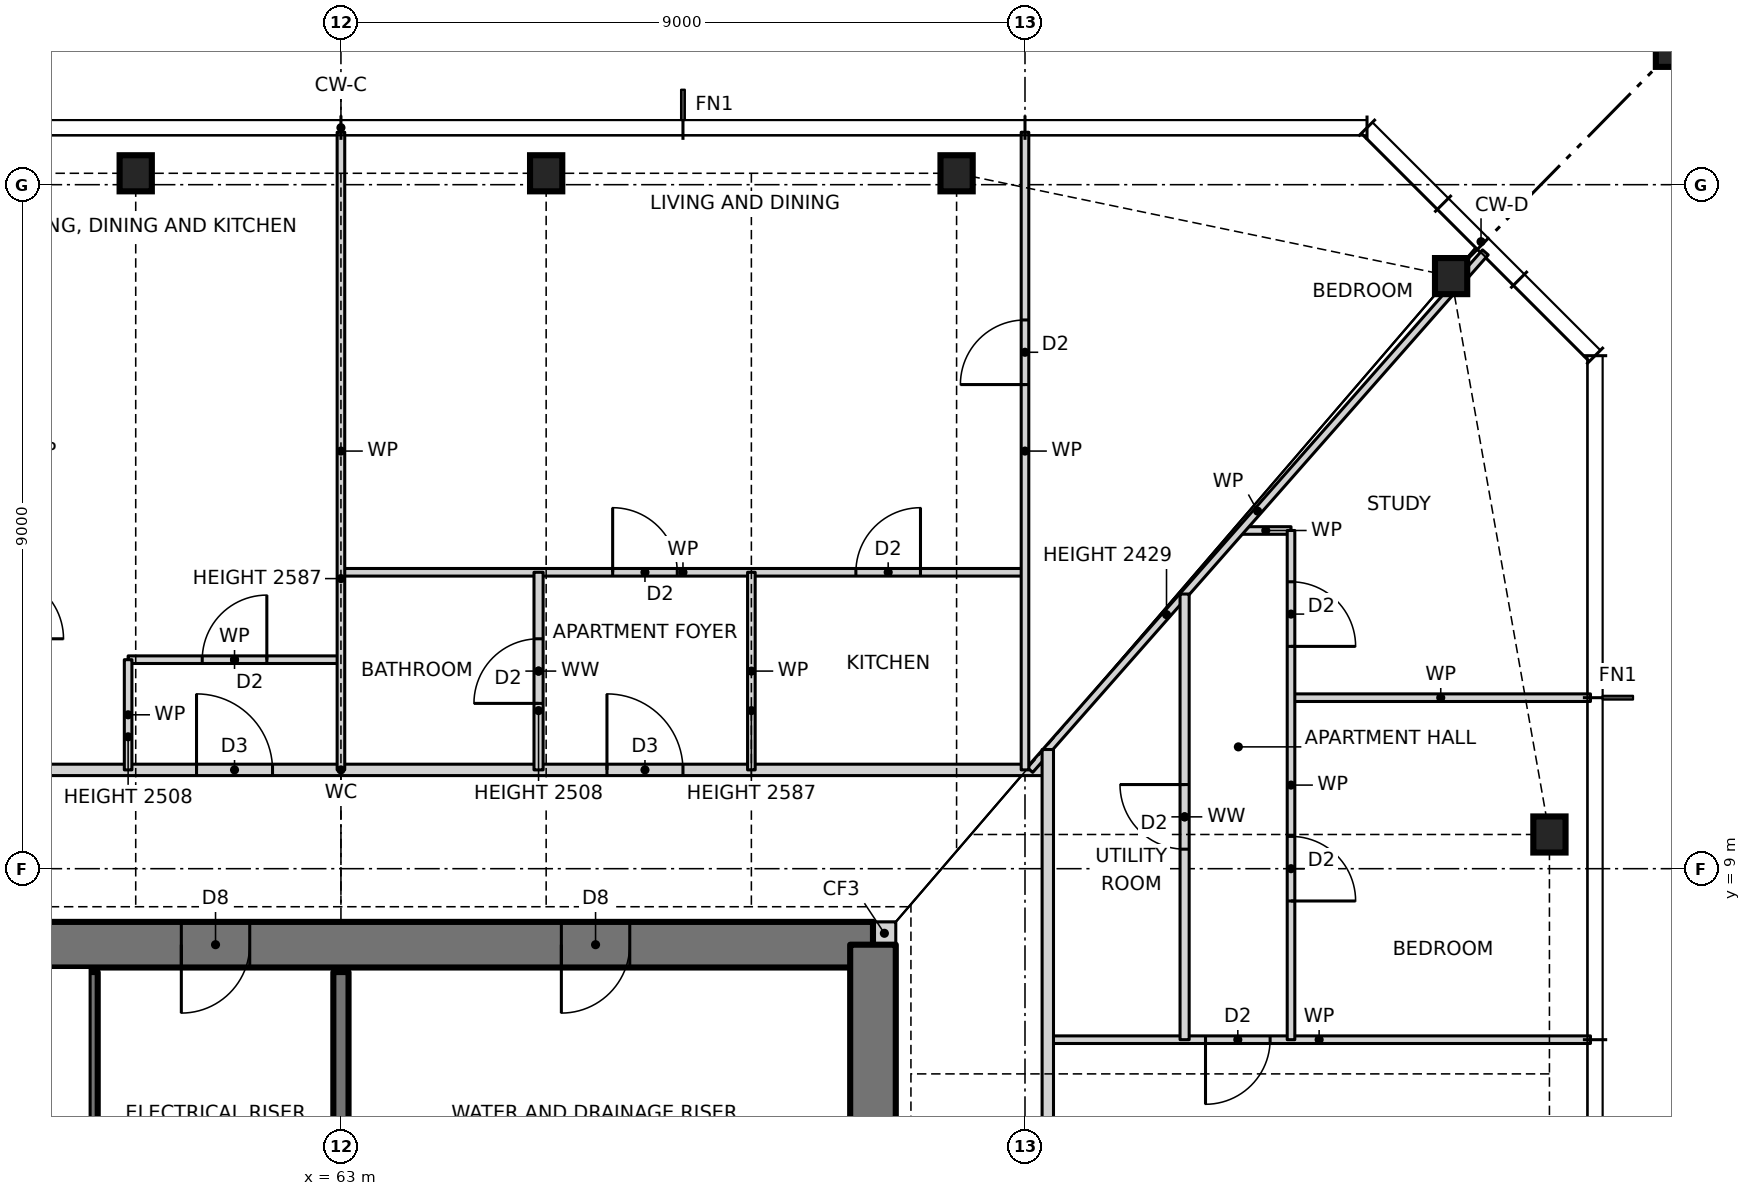
"""IFC4 building model, lengths in metres.
Left out: names, types, materials, properties, quantities, classifications, styles, units other than length and angle.
Written with IfcOpenShell. Run it as: python <this file> out.ifc"""

import sys

from ifc_helpers import new_model, si_unit, direction, frame, frame_2d, origin, origin_2d, place, context, subcontext, project, spatial, rectangle, hollow_rectangle, i_section, extrude, element, fill, save


model = new_model("IFC4")
c1 = context("Model", 3, precision=1e-05, world=origin(), true_north=direction((0.0, 1.0)))
c2 = subcontext(c1, "Body", "Model", "MODEL_VIEW")
j1 = project(units=[si_unit("LENGTHUNIT", "METRE"), si_unit("PLANEANGLEUNIT", "RADIAN")], contexts=[c1])
p1 = place(None, origin())
s1 = spatial("IfcSite", under=j1, at=p1, CompositionType="ELEMENT")
p2 = place(p1, origin())
s2 = spatial("IfcBuilding", under=s1, at=p2, CompositionType="ELEMENT")
p3 = place(p2, frame((0.0, 0.0, 67.5)))
s3 = spatial("IfcBuildingStorey", under=s2, at=p3, CompositionType="ELEMENT", Elevation=67.5)
for number, where, z_axis, x_axis in (
    (1, (78.9, 9.45, 0.0), (0.0, 0.0, 1.0), (1.0, 0.0, 0.0)),
    (2, (77.606, 16.797, 0.0), (0.0, 0.0, 1.0), (1.0, 0.0, 0.0)),
    (3, (71.1, 18.15, 0.0), (0.0, 0.0, 1.0), (1.0, 0.0, 0.0)),
    (4, (65.7, 18.15, 0.0), (0.0, 0.0, 1.0), (1.0, 0.0, 0.0)),
    (5, (60.3, 18.15, 0.0), (0.0, 0.0, 1.0), (1.0, 0.0, 0.0)),
):
    element("IfcColumn", number, at=place(p3, frame(where, z_axis=z_axis, x_axis=x_axis)), inside=s3, PredefinedType="COLUMN", context=c2, shape_type="SweptSolid", body=[
        extrude(i_section(OverallWidth=0.424, OverallDepth=0.475, WebThickness=0.048, FlangeThickness=0.077, at=origin_2d()), origin(), (0.0, 0.0, 1.0), 3.5),
    ])
p4 = place(p3, frame((80.9, 20.15, 0.0), z_axis=(0.0, 0.0, 1.0), x_axis=(1.0, 0.0, 0.0)))
e6 = element("IfcColumn", 6, at=p4, inside=s3, PredefinedType="COLUMN", context=c2, shape_type="SweptSolid", body=[
    extrude(hollow_rectangle(XDim=1.2, YDim=1.2, WallThickness=0.07, at=origin_2d()), origin(), (0.0, 0.0, 1.0), 3.5),
])
p5 = place(p3, frame((70.0, 8.15, 0.0), z_axis=(0.0, 0.0, 1.0), x_axis=(1.0, 0.0, 0.0)))
e7 = element("IfcWall", 7, at=p5, inside=s3, PredefinedType="SOLIDWALL", context=c2, shape_type="SweptSolid", body=[
    extrude(rectangle(XDim=0.3, YDim=0.3, at=frame_2d((0.15, 0.0))), origin(), (0.0, 0.0, 1.0), 3.5),
])
p6 = place(p3, frame((70.0, 8.0, 0.0), z_axis=(0.0, 0.0, 1.0), x_axis=(-1.0, 0.0, 0.0)))
e8 = element("IfcWall", 8, at=p6, inside=s3, PredefinedType="SHEAR", context=c2, shape_type="SweptSolid", body=[
    extrude(rectangle(XDim=14.0, YDim=0.6, at=frame_2d((7.0, 0.0))), origin(), (0.0, 0.0, 1.0), 3.5),
])
p7 = place(p6, frame((8.2, 0.0, 0.0)))
e9 = element("IfcOpeningElement", 9, at=p7, cuts=e8, PredefinedType="OPENING", context=c2, shape_type="SweptSolid", body=[
    extrude(rectangle(XDim=0.9, YDim=2.1, at=frame_2d((0.45, 1.05))), frame((0.0, 0.31, 0.0), z_axis=(0.0, -1.0, 0.0), x_axis=(1.0, 0.0, 0.0)), (0.0, 0.0, 1.0), 0.62),
])
p8 = place(p6, frame((3.2, 0.0, 0.0)))
e10 = element("IfcOpeningElement", 10, at=p8, cuts=e8, PredefinedType="OPENING", context=c2, shape_type="SweptSolid", body=[
    extrude(rectangle(XDim=0.9, YDim=2.1, at=frame_2d((0.45, 1.05))), frame((0.0, 0.31, 0.0), z_axis=(0.0, -1.0, 0.0), x_axis=(1.0, 0.0, 0.0)), (0.0, 0.0, 1.0), 0.62),
])
p9 = place(p3, frame((70.0, -8.0, 0.0), z_axis=(0.0, 0.0, 1.0), x_axis=(0.0, 1.0, 0.0)))
e11 = element("IfcWall", 11, at=p9, inside=s3, PredefinedType="SHEAR", context=c2, shape_type="SweptSolid", body=[
    extrude(rectangle(XDim=16.0, YDim=0.6, at=frame_2d((8.0, 0.0))), origin(), (0.0, 0.0, 1.0), 3.5),
])
p10 = place(p9, frame((7.5, 0.0, 0.0)))
e12 = element("IfcOpeningElement", 12, at=p10, cuts=e11, PredefinedType="OPENING", context=c2, shape_type="SweptSolid", body=[
    extrude(rectangle(XDim=1.0, YDim=2.1, at=frame_2d((0.5, 1.05))), frame((0.0, 0.31, 0.0), z_axis=(0.0, -1.0, 0.0), x_axis=(1.0, 0.0, 0.0)), (0.0, 0.0, 1.0), 0.62),
])
p11 = place(p3, frame((72.3, 6.75, 0.0), z_axis=(0.0, 0.0, 1.0), x_axis=(1.0, 0.0, 0.0)))
e13 = element("IfcWall", 13, at=p11, inside=s3, PredefinedType="PARTITIONING", context=c2, shape_type="SweptSolid", body=[
    extrude(rectangle(XDim=7.14, YDim=0.1, at=frame_2d((3.57, 0.0))), origin(), (0.0, 0.0, 1.0), 3.27),
])
p12 = place(p11, frame((2.075, 0.0, 0.0)))
e14 = element("IfcOpeningElement", 14, at=p12, cuts=e13, PredefinedType="OPENING", context=c2, shape_type="SweptSolid", body=[
    extrude(rectangle(XDim=0.85, YDim=2.1, at=frame_2d((0.425, 1.05))), frame((0.0, 0.06, 0.0), z_axis=(0.0, -1.0, 0.0), x_axis=(1.0, 0.0, 0.0)), (0.0, 0.0, 1.0), 0.12),
])
p13 = place(p3, frame((53.7, 10.3, 0.0), z_axis=(0.0, 0.0, 1.0), x_axis=(1.0, 0.0, 0.0)))
e15 = element("IfcWall", 15, at=p13, inside=s3, PredefinedType="PARTITIONING", context=c2, shape_type="SweptSolid", body=[
    extrude(rectangle(XDim=18.6, YDim=0.15, at=frame_2d((9.3, 0.0))), origin(), (0.0, 0.0, 1.0), 3.27),
])
p14 = place(p13, frame((12.8, 0.0, 0.0)))
e16 = element("IfcOpeningElement", 16, at=p14, cuts=e15, PredefinedType="OPENING", context=c2, shape_type="SweptSolid", body=[
    extrude(rectangle(XDim=1.0, YDim=2.1, at=frame_2d((0.5, 1.05))), frame((0.0, 0.085, 0.0), z_axis=(0.0, -1.0, 0.0), x_axis=(1.0, 0.0, 0.0)), (0.0, 0.0, 1.0), 0.17),
])
p15 = place(p13, frame((7.4, 0.0, 0.0)))
e17 = element("IfcOpeningElement", 17, at=p15, cuts=e15, PredefinedType="OPENING", context=c2, shape_type="SweptSolid", body=[
    extrude(rectangle(XDim=1.0, YDim=2.1, at=frame_2d((0.5, 1.05))), frame((0.0, 0.085, 0.0), z_axis=(0.0, -1.0, 0.0), x_axis=(1.0, 0.0, 0.0)), (0.0, 0.0, 1.0), 0.17),
])
p16 = place(p3, frame((75.5, 11.25, 0.0), z_axis=(0.0, 0.0, 1.0), x_axis=(1.0, 0.0, 0.0)))
e18 = element("IfcWall", 18, at=p16, inside=s3, PredefinedType="PARTITIONING", context=c2, shape_type="SweptSolid", body=[
    extrude(rectangle(XDim=3.94, YDim=0.1, at=frame_2d((1.97, 0.0))), origin(), (0.0, 0.0, 1.0), 3.27),
])
p17 = place(p3, frame((60.2, 11.75, 0.0), z_axis=(0.0, 0.0, 1.0), x_axis=(1.0, 0.0, 0.0)))
e19 = element("IfcWall", 19, at=p17, inside=s3, PredefinedType="PARTITIONING", context=c2, shape_type="SweptSolid", body=[
    extrude(rectangle(XDim=2.8, YDim=0.1, at=frame_2d((1.4, 0.0))), origin(), (0.0, 0.0, 1.0), 3.27),
])
p18 = place(p17, frame((0.975, 0.0, 0.0)))
e20 = element("IfcOpeningElement", 20, at=p18, cuts=e19, PredefinedType="OPENING", context=c2, shape_type="SweptSolid", body=[
    extrude(rectangle(XDim=0.85, YDim=2.1, at=frame_2d((0.425, 1.05))), frame((0.0, 0.06, 0.0), z_axis=(0.0, -1.0, 0.0), x_axis=(1.0, 0.0, 0.0)), (0.0, 0.0, 1.0), 0.12),
])
p19 = place(p3, frame((63.0, 12.9, 0.0), z_axis=(0.0, 0.0, 1.0), x_axis=(1.0, 0.0, 0.0)))
e21 = element("IfcWall", 21, at=p19, inside=s3, PredefinedType="PARTITIONING", context=c2, shape_type="SweptSolid", body=[
    extrude(rectangle(XDim=9.0, YDim=0.1, at=frame_2d((4.5, 0.0))), origin(), (0.0, 0.0, 1.0), 3.27),
])
p20 = place(p19, frame((6.775, 0.0, 0.0)))
e22 = element("IfcOpeningElement", 22, at=p20, cuts=e21, PredefinedType="OPENING", context=c2, shape_type="SweptSolid", body=[
    extrude(rectangle(XDim=0.85, YDim=2.1, at=frame_2d((0.425, 1.05))), frame((0.0, 0.06, 0.0), z_axis=(0.0, -1.0, 0.0), x_axis=(1.0, 0.0, 0.0)), (0.0, 0.0, 1.0), 0.12),
])
p21 = place(p19, frame((3.575, 0.0, 0.0)))
e23 = element("IfcOpeningElement", 23, at=p21, cuts=e21, PredefinedType="OPENING", context=c2, shape_type="SweptSolid", body=[
    extrude(rectangle(XDim=0.85, YDim=2.1, at=frame_2d((0.425, 1.05))), frame((0.0, 0.06, 0.0), z_axis=(0.0, -1.0, 0.0), x_axis=(1.0, 0.0, 0.0)), (0.0, 0.0, 1.0), 0.12),
])
p22 = place(p3, frame((74.836, 13.45, 0.0), z_axis=(0.0, 0.0, 1.0), x_axis=(1.0, 0.0, 0.0)))
e24 = element("IfcWall", 24, at=p22, inside=s3, PredefinedType="PARTITIONING", context=c2, shape_type="SweptSolid", body=[
    extrude(rectangle(XDim=0.664, YDim=0.1, at=frame_2d((0.332, 0.0))), origin(), (0.0, 0.0, 1.0), 3.27),
])
p23 = place(p3, frame((72.064, 10.3, 0.0), z_axis=(0.0, 0.0, 1.0), x_axis=(0.660700699661, 0.750649442461, 0.0)))
e25 = element("IfcWall", 25, at=p23, inside=s3, PredefinedType="PARTITIONING", context=c2, shape_type="SweptSolid", body=[
    extrude(rectangle(XDim=9.071, YDim=0.1, at=frame_2d((4.535, 0.0))), origin(), (0.0, 0.0, 1.0), 2.429),
])
p24 = place(p3, frame((75.5, 6.75, 0.0), z_axis=(0.0, 0.0, 1.0), x_axis=(0.0, 1.0, 0.0)))
e26 = element("IfcWall", 26, at=p24, inside=s3, PredefinedType="PARTITIONING", context=c2, shape_type="SweptSolid", body=[
    extrude(rectangle(XDim=6.7, YDim=0.1, at=frame_2d((3.35, 0.0))), origin(), (0.0, 0.0, 1.0), 3.27),
])
p25 = place(p24, frame((1.825, 0.0, 0.0)))
e27 = element("IfcOpeningElement", 27, at=p25, cuts=e26, PredefinedType="OPENING", context=c2, shape_type="SweptSolid", body=[
    extrude(rectangle(XDim=0.85, YDim=2.1, at=frame_2d((0.425, 1.05))), frame((0.0, 0.06, 0.0), z_axis=(0.0, -1.0, 0.0), x_axis=(1.0, 0.0, 0.0)), (0.0, 0.0, 1.0), 0.12),
])
p26 = place(p24, frame((5.175, 0.0, 0.0)))
e28 = element("IfcOpeningElement", 28, at=p26, cuts=e26, PredefinedType="OPENING", context=c2, shape_type="SweptSolid", body=[
    extrude(rectangle(XDim=0.85, YDim=2.1, at=frame_2d((0.425, 1.05))), frame((0.0, 0.06, 0.0), z_axis=(0.0, -1.0, 0.0), x_axis=(1.0, 0.0, 0.0)), (0.0, 0.0, 1.0), 0.12),
])
p27 = place(p3, frame((74.1, 6.75, 0.0), z_axis=(0.0, 0.0, 1.0), x_axis=(0.0, 1.0, 0.0)))
e29 = element("IfcWall", 29, at=p27, inside=s3, PredefinedType="PARTITIONING", context=c2, shape_type="SweptSolid", body=[
    extrude(rectangle(XDim=5.864, YDim=0.12, at=frame_2d((2.932, 0.0))), origin(), (0.0, 0.0, 1.0), 3.27),
])
p28 = place(p27, frame((2.507, 0.0, 0.0)))
e30 = element("IfcOpeningElement", 30, at=p28, cuts=e29, PredefinedType="OPENING", context=c2, shape_type="SweptSolid", body=[
    extrude(rectangle(XDim=0.85, YDim=2.1, at=frame_2d((0.425, 1.05))), frame((0.0, 0.07, 0.0), z_axis=(0.0, -1.0, 0.0), x_axis=(1.0, 0.0, 0.0)), (0.0, 0.0, 1.0), 0.14),
])
p29 = place(p3, frame((72.3, -10.568, 0.0), z_axis=(0.0, 0.0, 1.0), x_axis=(0.0, 1.0, 0.0)))
e31 = element("IfcWall", 31, at=p29, inside=s3, PredefinedType="PARTITIONING", context=c2, shape_type="SweptSolid", body=[
    extrude(rectangle(XDim=21.136, YDim=0.15, at=frame_2d((10.568, 0.0))), origin(), (0.0, 0.0, 1.0), 3.27),
])
p30 = place(p29, frame((10.068, 0.0, 0.0)))
e32 = element("IfcOpeningElement", 32, at=p30, cuts=e31, PredefinedType="OPENING", context=c2, shape_type="SweptSolid", body=[
    extrude(rectangle(XDim=1.0, YDim=2.1, at=frame_2d((0.5, 1.05))), frame((0.0, 0.085, 0.0), z_axis=(0.0, -1.0, 0.0), x_axis=(1.0, 0.0, 0.0)), (0.0, 0.0, 1.0), 0.17),
])
p31 = place(p3, frame((72.0, 10.3, 0.0), z_axis=(0.0, 0.0, 1.0), x_axis=(0.0, 1.0, 0.0)))
e33 = element("IfcWall", 33, at=p31, inside=s3, PredefinedType="PARTITIONING", context=c2, shape_type="SweptSolid", body=[
    extrude(rectangle(XDim=8.39, YDim=0.1, at=frame_2d((4.195, 0.0))), origin(), (0.0, 0.0, 1.0), 3.27),
])
p32 = place(p31, frame((5.07, 0.0, 0.0)))
e34 = element("IfcOpeningElement", 34, at=p32, cuts=e33, PredefinedType="OPENING", context=c2, shape_type="SweptSolid", body=[
    extrude(rectangle(XDim=0.85, YDim=2.1, at=frame_2d((0.425, 1.05))), frame((0.0, 0.06, 0.0), z_axis=(0.0, -1.0, 0.0), x_axis=(1.0, 0.0, 0.0)), (0.0, 0.0, 1.0), 0.12),
])
p33 = place(p3, frame((68.4, 10.3, 0.0), z_axis=(0.0, 0.0, 1.0), x_axis=(0.0, 1.0, 0.0)))
e35 = element("IfcWall", 35, at=p33, inside=s3, PredefinedType="PARTITIONING", context=c2, shape_type="SweptSolid", body=[
    extrude(rectangle(XDim=2.6, YDim=0.1, at=frame_2d((1.3, 0.0))), origin(), (0.0, 0.0, 1.0), 2.587),
])
p34 = place(p3, frame((65.6, 10.3, 0.0), z_axis=(0.0, 0.0, 1.0), x_axis=(0.0, 1.0, 0.0)))
e36 = element("IfcWall", 36, at=p34, inside=s3, PredefinedType="PARTITIONING", context=c2, shape_type="SweptSolid", body=[
    extrude(rectangle(XDim=2.6, YDim=0.12, at=frame_2d((1.3, 0.0))), origin(), (0.0, 0.0, 1.0), 2.508),
])
p35 = place(p34, frame((0.875, 0.0, 0.0)))
e37 = element("IfcOpeningElement", 37, at=p35, cuts=e36, PredefinedType="OPENING", context=c2, shape_type="SweptSolid", body=[
    extrude(rectangle(XDim=0.85, YDim=2.1, at=frame_2d((0.425, 1.05))), frame((0.0, 0.07, 0.0), z_axis=(0.0, -1.0, 0.0), x_axis=(1.0, 0.0, 0.0)), (0.0, 0.0, 1.0), 0.14),
])
p36 = place(p3, frame((63.0, 3.85, 0.0), z_axis=(0.0, 0.0, 1.0), x_axis=(0.0, 1.0, 0.0)))
e38 = element("IfcWall", 38, at=p36, inside=s3, PredefinedType="SOLIDWALL", context=c2, shape_type="SweptSolid", body=[
    extrude(rectangle(XDim=3.79, YDim=0.2, at=frame_2d((1.895, 0.0))), origin(), (0.0, 0.0, 1.0), 3.5),
])
p37 = place(p3, frame((63.0, 10.3, 0.0), z_axis=(0.0, 0.0, 1.0), x_axis=(0.0, 1.0, 0.0)))
e39 = element("IfcWall", 39, at=p37, inside=s3, PredefinedType="PARTITIONING", context=c2, shape_type="SweptSolid", body=[
    extrude(rectangle(XDim=8.39, YDim=0.1, at=frame_2d((4.195, 0.0))), origin(), (0.0, 0.0, 1.0), 2.587),
])
p38 = place(p3, frame((60.2, 10.3, 0.0), z_axis=(0.0, 0.0, 1.0), x_axis=(0.0, 1.0, 0.0)))
e40 = element("IfcWall", 40, at=p38, inside=s3, PredefinedType="PARTITIONING", context=c2, shape_type="SweptSolid", body=[
    extrude(rectangle(XDim=1.45, YDim=0.1, at=frame_2d((0.725, 0.0))), origin(), (0.0, 0.0, 1.0), 2.508),
])
p39 = place(p3, frame((59.7, 1.05, 0.0), z_axis=(0.0, 0.0, 1.0), x_axis=(0.0, 1.0, 0.0)))
e41 = element("IfcWall", 41, at=p39, inside=s3, PredefinedType="SOLIDWALL", context=c2, shape_type="SweptSolid", body=[
    extrude(rectangle(XDim=6.59, YDim=0.2, at=frame_2d((3.295, 0.0))), origin(), (0.0, 0.0, 1.0), 3.5),
])
p40 = place(p12, frame((0.85, 0.0, 0.0), z_axis=(0.0, 0.0, 1.0), x_axis=(-1.0, 0.0, 0.0)))
e42 = element("IfcDoor", 42, at=p40, inside=s3, OperationType="SINGLE_SWING_RIGHT", PredefinedType="DOOR", context=c2, shape_type="SweptSolid", body=[
    extrude(rectangle(XDim=0.85, YDim=2.1, at=frame_2d((0.425, 1.05))), frame((0.0, 0.025, 0.0), z_axis=(0.0, -1.0, 0.0), x_axis=(1.0, 0.0, 0.0)), (0.0, 0.0, 1.0), 0.05),
])
fill(e14, e42)
p41 = place(p25, frame((0.85, 0.0, 0.0), z_axis=(0.0, 0.0, 1.0), x_axis=(-1.0, 0.0, 0.0)))
e43 = element("IfcDoor", 43, at=p41, inside=s3, OperationType="SINGLE_SWING_RIGHT", PredefinedType="DOOR", context=c2, shape_type="SweptSolid", body=[
    extrude(rectangle(XDim=0.85, YDim=2.1, at=frame_2d((0.425, 1.05))), frame((0.0, 0.025, 0.0), z_axis=(0.0, -1.0, 0.0), x_axis=(1.0, 0.0, 0.0)), (0.0, 0.0, 1.0), 0.05),
])
fill(e27, e43)
p42 = place(p26, frame((0.85, 0.0, 0.0), z_axis=(0.0, 0.0, 1.0), x_axis=(-1.0, 0.0, 0.0)))
e44 = element("IfcDoor", 44, at=p42, inside=s3, OperationType="SINGLE_SWING_RIGHT", PredefinedType="DOOR", context=c2, shape_type="SweptSolid", body=[
    extrude(rectangle(XDim=0.85, YDim=2.1, at=frame_2d((0.425, 1.05))), frame((0.0, 0.025, 0.0), z_axis=(0.0, -1.0, 0.0), x_axis=(1.0, 0.0, 0.0)), (0.0, 0.0, 1.0), 0.05),
])
fill(e28, e44)
p43 = place(p28, origin())
e45 = element("IfcDoor", 45, at=p43, inside=s3, OperationType="SINGLE_SWING_RIGHT", PredefinedType="DOOR", context=c2, shape_type="SweptSolid", body=[
    extrude(rectangle(XDim=0.85, YDim=2.1, at=frame_2d((0.425, 1.05))), frame((0.0, 0.025, 0.0), z_axis=(0.0, -1.0, 0.0), x_axis=(1.0, 0.0, 0.0)), (0.0, 0.0, 1.0), 0.05),
])
fill(e30, e45)
p44 = place(p20, origin())
e46 = element("IfcDoor", 46, at=p44, inside=s3, OperationType="SINGLE_SWING_RIGHT", PredefinedType="DOOR", context=c2, shape_type="SweptSolid", body=[
    extrude(rectangle(XDim=0.85, YDim=2.1, at=frame_2d((0.425, 1.05))), frame((0.0, 0.025, 0.0), z_axis=(0.0, -1.0, 0.0), x_axis=(1.0, 0.0, 0.0)), (0.0, 0.0, 1.0), 0.05),
])
fill(e22, e46)
p45 = place(p14, origin())
e47 = element("IfcDoor", 47, at=p45, inside=s3, OperationType="SINGLE_SWING_LEFT", PredefinedType="DOOR", context=c2, shape_type="SweptSolid", body=[
    extrude(rectangle(XDim=1.0, YDim=2.1, at=frame_2d((0.5, 1.05))), frame((0.0, 0.025, 0.0), z_axis=(0.0, -1.0, 0.0), x_axis=(1.0, 0.0, 0.0)), (0.0, 0.0, 1.0), 0.05),
])
fill(e16, e47)
p46 = place(p21, origin())
e48 = element("IfcDoor", 48, at=p46, inside=s3, OperationType="SINGLE_SWING_LEFT", PredefinedType="DOOR", context=c2, shape_type="SweptSolid", body=[
    extrude(rectangle(XDim=0.85, YDim=2.1, at=frame_2d((0.425, 1.05))), frame((0.0, 0.025, 0.0), z_axis=(0.0, -1.0, 0.0), x_axis=(1.0, 0.0, 0.0)), (0.0, 0.0, 1.0), 0.05),
])
fill(e23, e48)
p47 = place(p35, origin())
e49 = element("IfcDoor", 49, at=p47, inside=s3, OperationType="SINGLE_SWING_LEFT", PredefinedType="DOOR", context=c2, shape_type="SweptSolid", body=[
    extrude(rectangle(XDim=0.85, YDim=2.1, at=frame_2d((0.425, 1.05))), frame((0.0, 0.025, 0.0), z_axis=(0.0, -1.0, 0.0), x_axis=(1.0, 0.0, 0.0)), (0.0, 0.0, 1.0), 0.05),
])
fill(e37, e49)
p48 = place(p32, origin())
e50 = element("IfcDoor", 50, at=p48, inside=s3, OperationType="SINGLE_SWING_LEFT", PredefinedType="DOOR", context=c2, shape_type="SweptSolid", body=[
    extrude(rectangle(XDim=0.85, YDim=2.1, at=frame_2d((0.425, 1.05))), frame((0.0, 0.025, 0.0), z_axis=(0.0, -1.0, 0.0), x_axis=(1.0, 0.0, 0.0)), (0.0, 0.0, 1.0), 0.05),
])
fill(e34, e50)
p49 = place(p15, origin())
e51 = element("IfcDoor", 51, at=p49, inside=s3, OperationType="SINGLE_SWING_LEFT", PredefinedType="DOOR", context=c2, shape_type="SweptSolid", body=[
    extrude(rectangle(XDim=1.0, YDim=2.1, at=frame_2d((0.5, 1.05))), frame((0.0, 0.025, 0.0), z_axis=(0.0, -1.0, 0.0), x_axis=(1.0, 0.0, 0.0)), (0.0, 0.0, 1.0), 0.05),
])
fill(e17, e51)
p50 = place(p18, origin())
e52 = element("IfcDoor", 52, at=p50, inside=s3, OperationType="SINGLE_SWING_RIGHT", PredefinedType="DOOR", context=c2, shape_type="SweptSolid", body=[
    extrude(rectangle(XDim=0.85, YDim=2.1, at=frame_2d((0.425, 1.05))), frame((0.0, 0.025, 0.0), z_axis=(0.0, -1.0, 0.0), x_axis=(1.0, 0.0, 0.0)), (0.0, 0.0, 1.0), 0.05),
])
fill(e20, e52)
p51 = place(p7, origin())
e53 = element("IfcDoor", 53, at=p51, inside=s3, OperationType="SINGLE_SWING_RIGHT", PredefinedType="DOOR", context=c2, shape_type="SweptSolid", body=[
    extrude(rectangle(XDim=0.9, YDim=2.1, at=frame_2d((0.45, 1.05))), frame((0.0, 0.025, 0.0), z_axis=(0.0, -1.0, 0.0), x_axis=(1.0, 0.0, 0.0)), (0.0, 0.0, 1.0), 0.05),
])
fill(e9, e53)
p52 = place(p8, origin())
e54 = element("IfcDoor", 54, at=p52, inside=s3, OperationType="SINGLE_SWING_RIGHT", PredefinedType="DOOR", context=c2, shape_type="SweptSolid", body=[
    extrude(rectangle(XDim=0.9, YDim=2.1, at=frame_2d((0.45, 1.05))), frame((0.0, 0.025, 0.0), z_axis=(0.0, -1.0, 0.0), x_axis=(1.0, 0.0, 0.0)), (0.0, 0.0, 1.0), 0.05),
])
fill(e10, e54)
save(model, sys.argv[1])
